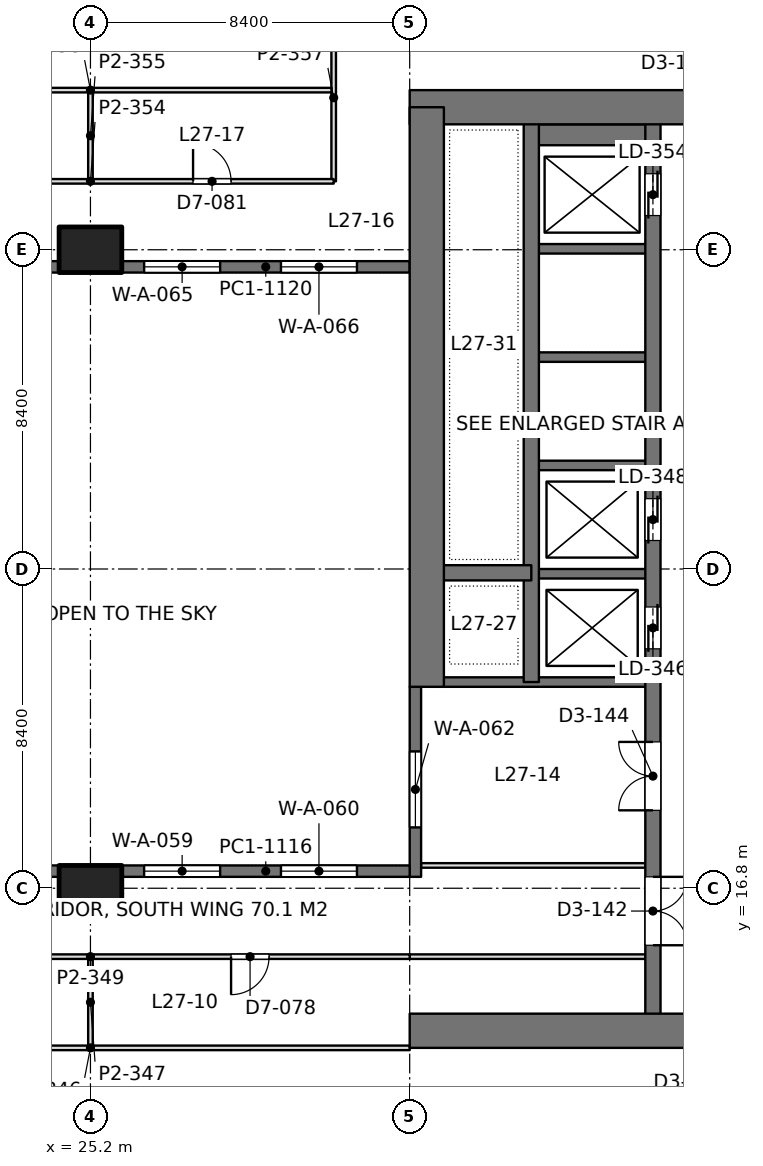
"""IFC4 building model, lengths in metres.
Left out: names, types, materials, properties, quantities, classifications, styles, units other than length and angle.
Written with IfcOpenShell. Run it as: python <this file> out.ifc"""

import sys

from ifc_helpers import new_model, si_unit, direction, frame, frame_2d, origin, origin_2d, place, context, subcontext, project, spatial, rectangle, extrude, element, fill, save


model = new_model("IFC4")
c1 = context("Model", 3, precision=1e-05, world=origin(), true_north=direction((0.0, 1.0)))
c2 = subcontext(c1, "Body", "Model", "MODEL_VIEW")
j1 = project(units=[si_unit("LENGTHUNIT", "METRE"), si_unit("PLANEANGLEUNIT", "RADIAN")], contexts=[c1])
p1 = place(None, origin())
s1 = spatial("IfcSite", under=j1, at=p1, CompositionType="ELEMENT")
p2 = place(p1, origin())
s2 = spatial("IfcBuilding", under=s1, at=p2, CompositionType="ELEMENT")
p3 = place(p2, frame((0.0, 0.0, 121.8)))
s3 = spatial("IfcBuildingStorey", under=s2, at=p3, CompositionType="ELEMENT", Elevation=121.8)
for number, where, z_axis, x_axis in (
    (1, (25.2, 16.8, 0.0), (0.0, 0.0, 1.0), (1.0, 0.0, 0.0)),
    (2, (25.2, 33.6, 0.0), (0.0, 0.0, 1.0), (1.0, 0.0, 0.0)),
):
    element("IfcColumn", number, at=place(p3, frame(where, z_axis=z_axis, x_axis=x_axis)), inside=s3, PredefinedType="COLUMN", context=c2, shape_type="SweptSolid", body=[
        extrude(rectangle(XDim=1.65, YDim=1.2, at=origin_2d()), origin(), (0.0, 0.0, 1.0), 4.2),
    ])
p4 = place(p3, frame((33.6, 13.05, 0.0), z_axis=(0.0, 0.0, 1.0), x_axis=(1.0, 0.0, 0.0)))
e3 = element("IfcWall", 3, at=p4, inside=s3, PredefinedType="SHEAR", context=c2, shape_type="SweptSolid", body=[
    extrude(rectangle(XDim=18.0, YDim=0.9, at=frame_2d((9.0, 0.0))), origin(), (0.0, 0.0, 1.0), 4.2),
])
p5 = place(p4, frame((7.25, 0.0, 0.0)))
e4 = element("IfcOpeningElement", 4, at=p5, cuts=e3, PredefinedType="OPENING", context=c2, shape_type="SweptSolid", body=[
    extrude(rectangle(XDim=1.8, YDim=2.4, at=frame_2d((0.9, 1.2))), frame((0.0, 0.46, 0.0), z_axis=(0.0, -1.0, 0.0), x_axis=(1.0, 0.0, 0.0)), (0.0, 0.0, 1.0), 0.92),
])
p6 = place(p3, frame((33.6, 37.35, 0.0), z_axis=(0.0, 0.0, 1.0), x_axis=(1.0, 0.0, 0.0)))
e5 = element("IfcWall", 5, at=p6, inside=s3, PredefinedType="SHEAR", context=c2, shape_type="SweptSolid", body=[
    extrude(rectangle(XDim=18.0, YDim=0.9, at=frame_2d((9.0, 0.0))), origin(), (0.0, 0.0, 1.0), 4.2),
])
p7 = place(p6, frame((7.25, 0.0, 0.0)))
e6 = element("IfcOpeningElement", 6, at=p7, cuts=e5, PredefinedType="OPENING", context=c2, shape_type="SweptSolid", body=[
    extrude(rectangle(XDim=1.8, YDim=2.4, at=frame_2d((0.9, 1.2))), frame((0.0, 0.46, 0.0), z_axis=(0.0, -1.0, 0.0), x_axis=(1.0, 0.0, 0.0)), (0.0, 0.0, 1.0), 0.92),
])
p8 = place(p3, frame((34.05, 22.1, 0.0), z_axis=(0.0, 0.0, 1.0), x_axis=(0.0, 1.0, 0.0)))
e7 = element("IfcWall", 7, at=p8, inside=s3, PredefinedType="SHEAR", context=c2, shape_type="SweptSolid", body=[
    extrude(rectangle(XDim=15.25, YDim=0.9, at=frame_2d((7.625, 0.0))), origin(), (0.0, 0.0, 1.0), 4.2),
])
p9 = place(p3, frame((40.0, 13.05, 0.0), z_axis=(0.0, 0.0, 1.0), x_axis=(0.0, 1.0, 0.0)))
e8 = element("IfcWall", 8, at=p9, inside=s3, PredefinedType="SHEAR", context=c2, shape_type="SweptSolid", body=[
    extrude(rectangle(XDim=24.3, YDim=0.4, at=frame_2d((12.15, 0.0))), origin(), (0.0, 0.0, 1.0), 4.2),
])
p10 = place(p9, frame((10.05, 0.0, 0.0)))
e9 = element("IfcOpeningElement", 9, at=p10, cuts=e8, PredefinedType="OPENING", context=c2, shape_type="SweptSolid", body=[
    extrude(rectangle(XDim=1.1, YDim=2.2, at=frame_2d((0.55, 1.1))), frame((0.0, 0.21, 0.0), z_axis=(0.0, -1.0, 0.0), x_axis=(1.0, 0.0, 0.0)), (0.0, 0.0, 1.0), 0.42),
])
p11 = place(p9, frame((12.9, 0.0, 0.0)))
e10 = element("IfcOpeningElement", 10, at=p11, cuts=e8, PredefinedType="OPENING", context=c2, shape_type="SweptSolid", body=[
    extrude(rectangle(XDim=1.1, YDim=2.2, at=frame_2d((0.55, 1.1))), frame((0.0, 0.21, 0.0), z_axis=(0.0, -1.0, 0.0), x_axis=(1.0, 0.0, 0.0)), (0.0, 0.0, 1.0), 0.42),
])
p12 = place(p9, frame((21.45, 0.0, 0.0)))
e11 = element("IfcOpeningElement", 11, at=p12, cuts=e8, PredefinedType="OPENING", context=c2, shape_type="SweptSolid", body=[
    extrude(rectangle(XDim=1.1, YDim=2.2, at=frame_2d((0.55, 1.1))), frame((0.0, 0.21, 0.0), z_axis=(0.0, -1.0, 0.0), x_axis=(1.0, 0.0, 0.0)), (0.0, 0.0, 1.0), 0.42),
])
p13 = place(p9, frame((2.25, 0.0, 0.0)))
e12 = element("IfcOpeningElement", 12, at=p13, cuts=e8, PredefinedType="OPENING", context=c2, shape_type="SweptSolid", body=[
    extrude(rectangle(XDim=1.8, YDim=2.4, at=frame_2d((0.9, 1.2))), frame((0.0, 0.21, 0.0), z_axis=(0.0, -1.0, 0.0), x_axis=(1.0, 0.0, 0.0)), (0.0, 0.0, 1.0), 0.42),
])
p14 = place(p9, frame((5.8, 0.0, 0.0)))
e13 = element("IfcOpeningElement", 13, at=p14, cuts=e8, PredefinedType="OPENING", context=c2, shape_type="SweptSolid", body=[
    extrude(rectangle(XDim=1.8, YDim=2.4, at=frame_2d((0.9, 1.2))), frame((0.0, 0.21, 0.0), z_axis=(0.0, -1.0, 0.0), x_axis=(1.0, 0.0, 0.0)), (0.0, 0.0, 1.0), 0.42),
])
p15 = place(p3, frame((36.8, 22.225, 0.0), z_axis=(0.0, 0.0, 1.0), x_axis=(0.0, 1.0, 0.0)))
e14 = element("IfcWall", 14, at=p15, inside=s3, PredefinedType="SHEAR", context=c2, shape_type="SweptSolid", body=[
    extrude(rectangle(XDim=15.125, YDim=0.4, at=frame_2d((7.562, 0.0))), origin(), (0.0, 0.0, 1.0), 4.2),
])
p16 = place(p3, frame((36.8, 25.1, 0.0), z_axis=(0.0, 0.0, 1.0), x_axis=(-1.0, 0.0, 0.0)))
e15 = element("IfcWall", 15, at=p16, inside=s3, PredefinedType="SHEAR", context=c2, shape_type="SweptSolid", body=[
    extrude(rectangle(XDim=2.75, YDim=0.4, at=frame_2d((1.375, 0.0))), origin(), (0.0, 0.0, 1.0), 4.2),
])
p17 = place(p3, frame((40.0, 22.225, 0.0), z_axis=(0.0, 0.0, 1.0), x_axis=(-1.0, 0.0, 0.0)))
e16 = element("IfcWall", 16, at=p17, inside=s3, PredefinedType="SHEAR", context=c2, shape_type="SweptSolid", body=[
    extrude(rectangle(XDim=5.95, YDim=0.25, at=frame_2d((2.975, 0.0))), origin(), (0.0, 0.0, 1.0), 4.2),
])
for number, where, z_axis, x_axis in (
    (17, (40.0, 25.075, 0.0), (0.0, 0.0, 1.0), (-1.0, 0.0, 0.0)),
    (18, (40.0, 27.925, 0.0), (0.0, 0.0, 1.0), (-1.0, 0.0, 0.0)),
    (19, (40.0, 30.775, 0.0), (0.0, 0.0, 1.0), (-1.0, 0.0, 0.0)),
    (20, (40.0, 33.625, 0.0), (0.0, 0.0, 1.0), (-1.0, 0.0, 0.0)),
):
    element("IfcWall", number, at=place(p3, frame(where, z_axis=z_axis, x_axis=x_axis)), inside=s3, PredefinedType="SHEAR", context=c2, shape_type="SweptSolid", body=[
        extrude(rectangle(XDim=3.2, YDim=0.25, at=frame_2d((1.6, 0.0))), origin(), (0.0, 0.0, 1.0), 4.2),
    ])
p18 = place(p3, frame((40.0, 36.625, 0.0), z_axis=(0.0, 0.0, 1.0), x_axis=(-1.0, 0.0, 0.0)))
e21 = element("IfcWall", 21, at=p18, inside=s3, PredefinedType="SHEAR", context=c2, shape_type="SweptSolid", body=[
    extrude(rectangle(XDim=3.2, YDim=0.55, at=frame_2d((1.6, 0.0))), origin(), (0.0, 0.0, 1.0), 4.2),
])
p19 = place(p3, frame((33.75, 17.1, 0.0), z_axis=(0.0, 0.0, 1.0), x_axis=(0.0, 1.0, 0.0)))
e22 = element("IfcWall", 22, at=p19, inside=s3, PredefinedType="SOLIDWALL", context=c2, shape_type="SweptSolid", body=[
    extrude(rectangle(XDim=5.0, YDim=0.3, at=frame_2d((2.5, 0.0))), origin(), (0.0, 0.0, 1.0), 4.05),
])
p20 = place(p19, frame((1.3, 0.0, 0.1)))
e23 = element("IfcOpeningElement", 23, at=p20, cuts=e22, PredefinedType="OPENING", context=c2, shape_type="SweptSolid", body=[
    extrude(rectangle(XDim=2.0, YDim=3.0, at=frame_2d((1.0, 1.5))), frame((0.0, 0.16, 0.0), z_axis=(0.0, -1.0, 0.0), x_axis=(1.0, 0.0, 0.0)), (0.0, 0.0, 1.0), 0.32),
])
p21 = place(p3, frame((16.8, 17.25, 0.0), z_axis=(0.0, 0.0, 1.0), x_axis=(1.0, 0.0, 0.0)))
e24 = element("IfcWall", 24, at=p21, inside=s3, PredefinedType="SOLIDWALL", context=c2, shape_type="SweptSolid", body=[
    extrude(rectangle(XDim=7.575, YDim=0.3, at=frame_2d((3.788, 0.0))), origin(), (0.0, 0.0, 1.0), 4.05),
])
p22 = place(p21, frame((0.988, 0.0, 0.1)))
e25 = element("IfcOpeningElement", 25, at=p22, cuts=e24, PredefinedType="OPENING", context=c2, shape_type="SweptSolid", body=[
    extrude(rectangle(XDim=2.0, YDim=3.0, at=frame_2d((1.0, 1.5))), frame((0.0, 0.16, 0.0), z_axis=(0.0, -1.0, 0.0), x_axis=(1.0, 0.0, 0.0)), (0.0, 0.0, 1.0), 0.32),
])
p23 = place(p21, frame((4.587, 0.0, 0.1)))
e26 = element("IfcOpeningElement", 26, at=p23, cuts=e24, PredefinedType="OPENING", context=c2, shape_type="SweptSolid", body=[
    extrude(rectangle(XDim=2.0, YDim=3.0, at=frame_2d((1.0, 1.5))), frame((0.0, 0.16, 0.0), z_axis=(0.0, -1.0, 0.0), x_axis=(1.0, 0.0, 0.0)), (0.0, 0.0, 1.0), 0.32),
])
p24 = place(p3, frame((26.025, 17.25, 0.0), z_axis=(0.0, 0.0, 1.0), x_axis=(1.0, 0.0, 0.0)))
e27 = element("IfcWall", 27, at=p24, inside=s3, PredefinedType="SOLIDWALL", context=c2, shape_type="SweptSolid", body=[
    extrude(rectangle(XDim=7.575, YDim=0.3, at=frame_2d((3.788, 0.0))), origin(), (0.0, 0.0, 1.0), 4.05),
])
p25 = place(p24, frame((0.587, 0.0, 0.1)))
e28 = element("IfcOpeningElement", 28, at=p25, cuts=e27, PredefinedType="OPENING", context=c2, shape_type="SweptSolid", body=[
    extrude(rectangle(XDim=2.0, YDim=3.0, at=frame_2d((1.0, 1.5))), frame((0.0, 0.16, 0.0), z_axis=(0.0, -1.0, 0.0), x_axis=(1.0, 0.0, 0.0)), (0.0, 0.0, 1.0), 0.32),
])
p26 = place(p24, frame((4.188, 0.0, 0.1)))
e29 = element("IfcOpeningElement", 29, at=p26, cuts=e27, PredefinedType="OPENING", context=c2, shape_type="SweptSolid", body=[
    extrude(rectangle(XDim=2.0, YDim=3.0, at=frame_2d((1.0, 1.5))), frame((0.0, 0.16, 0.0), z_axis=(0.0, -1.0, 0.0), x_axis=(1.0, 0.0, 0.0)), (0.0, 0.0, 1.0), 0.32),
])
p27 = place(p3, frame((16.8, 33.15, 0.0), z_axis=(0.0, 0.0, 1.0), x_axis=(1.0, 0.0, 0.0)))
e30 = element("IfcWall", 30, at=p27, inside=s3, PredefinedType="SOLIDWALL", context=c2, shape_type="SweptSolid", body=[
    extrude(rectangle(XDim=7.575, YDim=0.3, at=frame_2d((3.788, 0.0))), origin(), (0.0, 0.0, 1.0), 4.05),
])
p28 = place(p27, frame((0.988, 0.0, 0.1)))
e31 = element("IfcOpeningElement", 31, at=p28, cuts=e30, PredefinedType="OPENING", context=c2, shape_type="SweptSolid", body=[
    extrude(rectangle(XDim=2.0, YDim=3.0, at=frame_2d((1.0, 1.5))), frame((0.0, 0.16, 0.0), z_axis=(0.0, -1.0, 0.0), x_axis=(1.0, 0.0, 0.0)), (0.0, 0.0, 1.0), 0.32),
])
p29 = place(p27, frame((4.587, 0.0, 0.1)))
e32 = element("IfcOpeningElement", 32, at=p29, cuts=e30, PredefinedType="OPENING", context=c2, shape_type="SweptSolid", body=[
    extrude(rectangle(XDim=2.0, YDim=3.0, at=frame_2d((1.0, 1.5))), frame((0.0, 0.16, 0.0), z_axis=(0.0, -1.0, 0.0), x_axis=(1.0, 0.0, 0.0)), (0.0, 0.0, 1.0), 0.32),
])
p30 = place(p3, frame((26.025, 33.15, 0.0), z_axis=(0.0, 0.0, 1.0), x_axis=(1.0, 0.0, 0.0)))
e33 = element("IfcWall", 33, at=p30, inside=s3, PredefinedType="SOLIDWALL", context=c2, shape_type="SweptSolid", body=[
    extrude(rectangle(XDim=7.575, YDim=0.3, at=frame_2d((3.788, 0.0))), origin(), (0.0, 0.0, 1.0), 4.05),
])
p31 = place(p30, frame((0.587, 0.0, 0.1)))
e34 = element("IfcOpeningElement", 34, at=p31, cuts=e33, PredefinedType="OPENING", context=c2, shape_type="SweptSolid", body=[
    extrude(rectangle(XDim=2.0, YDim=3.0, at=frame_2d((1.0, 1.5))), frame((0.0, 0.16, 0.0), z_axis=(0.0, -1.0, 0.0), x_axis=(1.0, 0.0, 0.0)), (0.0, 0.0, 1.0), 0.32),
])
p32 = place(p30, frame((4.188, 0.0, 0.1)))
e35 = element("IfcOpeningElement", 35, at=p32, cuts=e33, PredefinedType="OPENING", context=c2, shape_type="SweptSolid", body=[
    extrude(rectangle(XDim=2.0, YDim=3.0, at=frame_2d((1.0, 1.5))), frame((0.0, 0.16, 0.0), z_axis=(0.0, -1.0, 0.0), x_axis=(1.0, 0.0, 0.0)), (0.0, 0.0, 1.0), 0.32),
])
p33 = place(p3, frame((33.898, 17.4, 0.0), z_axis=(0.0, 0.0, 1.0), x_axis=(1.0, 0.0, 0.0)))
e36 = element("IfcWall", 36, at=p33, inside=s3, PredefinedType="PARTITIONING", context=c2, shape_type="SweptSolid", body=[
    extrude(rectangle(XDim=5.904, YDim=0.12, at=frame_2d((2.952, 0.0))), origin(), (0.0, 0.0, 1.0), 3.55),
])
p34 = place(p3, frame((33.598, 15.0, 0.0), z_axis=(0.0, 0.0, 1.0), x_axis=(1.0, 0.0, 0.0)))
e37 = element("IfcWall", 37, at=p34, inside=s3, PredefinedType="PARTITIONING", context=c2, shape_type="SweptSolid", body=[
    extrude(rectangle(XDim=6.204, YDim=0.12, at=frame_2d((3.102, 0.0))), origin(), (0.0, 0.0, 1.0), 3.55),
])
p35 = place(p3, frame((25.2, 12.658, 0.0), z_axis=(0.0, 0.0, 1.0), x_axis=(0.0, 1.0, 0.0)))
e38 = element("IfcWall", 38, at=p35, inside=s3, PredefinedType="PARTITIONING", context=c2, shape_type="SweptSolid", body=[
    extrude(rectangle(XDim=2.284, YDim=0.12, at=frame_2d((1.142, 0.0))), origin(), (0.0, 0.0, 1.0), 3.55),
])
p36 = place(p3, frame((16.798, 15.0, 0.0), z_axis=(0.0, 0.0, 1.0), x_axis=(1.0, 0.0, 0.0)))
e39 = element("IfcWall", 39, at=p36, inside=s3, PredefinedType="PARTITIONING", context=c2, shape_type="SweptSolid", body=[
    extrude(rectangle(XDim=16.804, YDim=0.12, at=frame_2d((8.402, 0.0))), origin(), (0.0, 0.0, 1.0), 3.55),
])
p37 = place(p36, frame((3.702, 0.0, 0.0)))
e40 = element("IfcOpeningElement", 40, at=p37, cuts=e39, PredefinedType="OPENING", context=c2, shape_type="SweptSolid", body=[
    extrude(rectangle(XDim=1.0, YDim=2.4, at=frame_2d((0.5, 1.2))), frame((0.0, 0.07, 0.0), z_axis=(0.0, -1.0, 0.0), x_axis=(1.0, 0.0, 0.0)), (0.0, 0.0, 1.0), 0.14),
])
p38 = place(p36, frame((12.102, 0.0, 0.0)))
e41 = element("IfcOpeningElement", 41, at=p38, cuts=e39, PredefinedType="OPENING", context=c2, shape_type="SweptSolid", body=[
    extrude(rectangle(XDim=1.0, YDim=2.4, at=frame_2d((0.5, 1.2))), frame((0.0, 0.07, 0.0), z_axis=(0.0, -1.0, 0.0), x_axis=(1.0, 0.0, 0.0)), (0.0, 0.0, 1.0), 0.14),
])
p39 = place(p3, frame((16.8, 12.6, 0.0), z_axis=(0.0, 0.0, 1.0), x_axis=(1.0, 0.0, 0.0)))
e42 = element("IfcWall", 42, at=p39, inside=s3, PredefinedType="PARTITIONING", context=c2, shape_type="SweptSolid", body=[
    extrude(rectangle(XDim=16.8, YDim=0.12, at=frame_2d((8.4, 0.0))), origin(), (0.0, 0.0, 1.0), 3.55),
])
p40 = place(p3, frame((31.6, 35.4, 0.0), z_axis=(0.0, 0.0, 1.0), x_axis=(0.0, 1.0, 0.0)))
e43 = element("IfcWall", 43, at=p40, inside=s3, PredefinedType="PARTITIONING", context=c2, shape_type="SweptSolid", body=[
    extrude(rectangle(XDim=4.4, YDim=0.12, at=frame_2d((2.2, 0.0))), origin(), (0.0, 0.0, 1.0), 4.05),
])
p41 = place(p3, frame((25.2, 35.458, 0.0), z_axis=(0.0, 0.0, 1.0), x_axis=(0.0, 1.0, 0.0)))
e44 = element("IfcWall", 44, at=p41, inside=s3, PredefinedType="PARTITIONING", context=c2, shape_type="SweptSolid", body=[
    extrude(rectangle(XDim=2.284, YDim=0.12, at=frame_2d((1.142, 0.0))), origin(), (0.0, 0.0, 1.0), 3.55),
])
p42 = place(p3, frame((18.8, 35.4, 0.0), z_axis=(0.0, 0.0, 1.0), x_axis=(1.0, 0.0, 0.0)))
e45 = element("IfcWall", 45, at=p42, inside=s3, PredefinedType="PARTITIONING", context=c2, shape_type="SweptSolid", body=[
    extrude(rectangle(XDim=12.8, YDim=0.12, at=frame_2d((6.4, 0.0))), origin(), (0.0, 0.0, 1.0), 3.55),
])
p43 = place(p42, frame((2.7, 0.0, 0.0)))
e46 = element("IfcOpeningElement", 46, at=p43, cuts=e45, PredefinedType="OPENING", context=c2, shape_type="SweptSolid", body=[
    extrude(rectangle(XDim=1.0, YDim=2.4, at=frame_2d((0.5, 1.2))), frame((0.0, 0.07, 0.0), z_axis=(0.0, -1.0, 0.0), x_axis=(1.0, 0.0, 0.0)), (0.0, 0.0, 1.0), 0.14),
])
p44 = place(p42, frame((9.1, 0.0, 0.0)))
e47 = element("IfcOpeningElement", 47, at=p44, cuts=e45, PredefinedType="OPENING", context=c2, shape_type="SweptSolid", body=[
    extrude(rectangle(XDim=1.0, YDim=2.4, at=frame_2d((0.5, 1.2))), frame((0.0, 0.07, 0.0), z_axis=(0.0, -1.0, 0.0), x_axis=(1.0, 0.0, 0.0)), (0.0, 0.0, 1.0), 0.14),
])
p45 = place(p3, frame((18.858, 37.8, 0.0), z_axis=(0.0, 0.0, 1.0), x_axis=(1.0, 0.0, 0.0)))
e48 = element("IfcWall", 48, at=p45, inside=s3, PredefinedType="PARTITIONING", context=c2, shape_type="SweptSolid", body=[
    extrude(rectangle(XDim=12.684, YDim=0.12, at=frame_2d((6.342, 0.0))), origin(), (0.0, 0.0, 1.0), 3.55),
])
p46 = place(p20, origin())
e49 = element("IfcWindow", 49, at=p46, inside=s3, PartitioningType="SINGLE_PANEL", PredefinedType="WINDOW", context=c2, shape_type="SweptSolid", body=[
    extrude(rectangle(XDim=2.0, YDim=3.0, at=frame_2d((1.0, 1.5))), frame((0.0, 0.03, 0.0), z_axis=(0.0, -1.0, 0.0), x_axis=(1.0, 0.0, 0.0)), (0.0, 0.0, 1.0), 0.06),
])
fill(e23, e49)
p47 = place(p25, origin())
e50 = element("IfcWindow", 50, at=p47, inside=s3, PartitioningType="SINGLE_PANEL", PredefinedType="WINDOW", context=c2, shape_type="SweptSolid", body=[
    extrude(rectangle(XDim=2.0, YDim=3.0, at=frame_2d((1.0, 1.5))), frame((0.0, 0.03, 0.0), z_axis=(0.0, -1.0, 0.0), x_axis=(1.0, 0.0, 0.0)), (0.0, 0.0, 1.0), 0.06),
])
fill(e28, e50)
p48 = place(p26, origin())
e51 = element("IfcWindow", 51, at=p48, inside=s3, PartitioningType="SINGLE_PANEL", PredefinedType="WINDOW", context=c2, shape_type="SweptSolid", body=[
    extrude(rectangle(XDim=2.0, YDim=3.0, at=frame_2d((1.0, 1.5))), frame((0.0, 0.03, 0.0), z_axis=(0.0, -1.0, 0.0), x_axis=(1.0, 0.0, 0.0)), (0.0, 0.0, 1.0), 0.06),
])
fill(e29, e51)
p49 = place(p31, origin())
e52 = element("IfcWindow", 52, at=p49, inside=s3, PartitioningType="SINGLE_PANEL", PredefinedType="WINDOW", context=c2, shape_type="SweptSolid", body=[
    extrude(rectangle(XDim=2.0, YDim=3.0, at=frame_2d((1.0, 1.5))), frame((0.0, 0.03, 0.0), z_axis=(0.0, -1.0, 0.0), x_axis=(1.0, 0.0, 0.0)), (0.0, 0.0, 1.0), 0.06),
])
fill(e34, e52)
p50 = place(p32, origin())
e53 = element("IfcWindow", 53, at=p50, inside=s3, PartitioningType="SINGLE_PANEL", PredefinedType="WINDOW", context=c2, shape_type="SweptSolid", body=[
    extrude(rectangle(XDim=2.0, YDim=3.0, at=frame_2d((1.0, 1.5))), frame((0.0, 0.03, 0.0), z_axis=(0.0, -1.0, 0.0), x_axis=(1.0, 0.0, 0.0)), (0.0, 0.0, 1.0), 0.06),
])
fill(e35, e53)
p51 = place(p10, origin())
e54 = element("IfcDoor", 54, at=p51, inside=s3, OperationType="DOUBLE_DOOR_SLIDING", PredefinedType="DOOR", context=c2, shape_type="SweptSolid", body=[
    extrude(rectangle(XDim=1.1, YDim=2.2, at=frame_2d((0.55, 1.1))), frame((0.0, 0.025, 0.0), z_axis=(0.0, -1.0, 0.0), x_axis=(1.0, 0.0, 0.0)), (0.0, 0.0, 1.0), 0.05),
])
fill(e9, e54)
p52 = place(p11, origin())
e55 = element("IfcDoor", 55, at=p52, inside=s3, OperationType="DOUBLE_DOOR_SLIDING", PredefinedType="DOOR", context=c2, shape_type="SweptSolid", body=[
    extrude(rectangle(XDim=1.1, YDim=2.2, at=frame_2d((0.55, 1.1))), frame((0.0, 0.025, 0.0), z_axis=(0.0, -1.0, 0.0), x_axis=(1.0, 0.0, 0.0)), (0.0, 0.0, 1.0), 0.05),
])
fill(e10, e55)
p53 = place(p12, origin())
e56 = element("IfcDoor", 56, at=p53, inside=s3, OperationType="DOUBLE_DOOR_SLIDING", PredefinedType="DOOR", context=c2, shape_type="SweptSolid", body=[
    extrude(rectangle(XDim=1.1, YDim=2.2, at=frame_2d((0.55, 1.1))), frame((0.0, 0.025, 0.0), z_axis=(0.0, -1.0, 0.0), x_axis=(1.0, 0.0, 0.0)), (0.0, 0.0, 1.0), 0.05),
])
fill(e11, e56)
p54 = place(p13, frame((1.8, 0.0, 0.0), z_axis=(0.0, 0.0, 1.0), x_axis=(-1.0, 0.0, 0.0)))
e57 = element("IfcDoor", 57, at=p54, inside=s3, OperationType="DOUBLE_DOOR_SINGLE_SWING", PredefinedType="DOOR", context=c2, shape_type="SweptSolid", body=[
    extrude(rectangle(XDim=1.8, YDim=2.4, at=frame_2d((0.9, 1.2))), frame((0.0, 0.025, 0.0), z_axis=(0.0, -1.0, 0.0), x_axis=(1.0, 0.0, 0.0)), (0.0, 0.0, 1.0), 0.05),
])
fill(e12, e57)
p55 = place(p14, origin())
e58 = element("IfcDoor", 58, at=p55, inside=s3, OperationType="DOUBLE_DOOR_SINGLE_SWING", PredefinedType="DOOR", context=c2, shape_type="SweptSolid", body=[
    extrude(rectangle(XDim=1.8, YDim=2.4, at=frame_2d((0.9, 1.2))), frame((0.0, 0.025, 0.0), z_axis=(0.0, -1.0, 0.0), x_axis=(1.0, 0.0, 0.0)), (0.0, 0.0, 1.0), 0.05),
])
fill(e13, e58)
p56 = place(p38, frame((1.0, 0.0, 0.0), z_axis=(0.0, 0.0, 1.0), x_axis=(-1.0, 0.0, 0.0)))
e59 = element("IfcDoor", 59, at=p56, inside=s3, OperationType="SINGLE_SWING_RIGHT", PredefinedType="DOOR", context=c2, shape_type="SweptSolid", body=[
    extrude(rectangle(XDim=1.0, YDim=2.4, at=frame_2d((0.5, 1.2))), frame((0.0, 0.025, 0.0), z_axis=(0.0, -1.0, 0.0), x_axis=(1.0, 0.0, 0.0)), (0.0, 0.0, 1.0), 0.05),
])
fill(e41, e59)
p57 = place(p44, origin())
e60 = element("IfcDoor", 60, at=p57, inside=s3, OperationType="SINGLE_SWING_LEFT", PredefinedType="DOOR", context=c2, shape_type="SweptSolid", body=[
    extrude(rectangle(XDim=1.0, YDim=2.4, at=frame_2d((0.5, 1.2))), frame((0.0, 0.025, 0.0), z_axis=(0.0, -1.0, 0.0), x_axis=(1.0, 0.0, 0.0)), (0.0, 0.0, 1.0), 0.05),
])
fill(e47, e60)
save(model, sys.argv[1])
